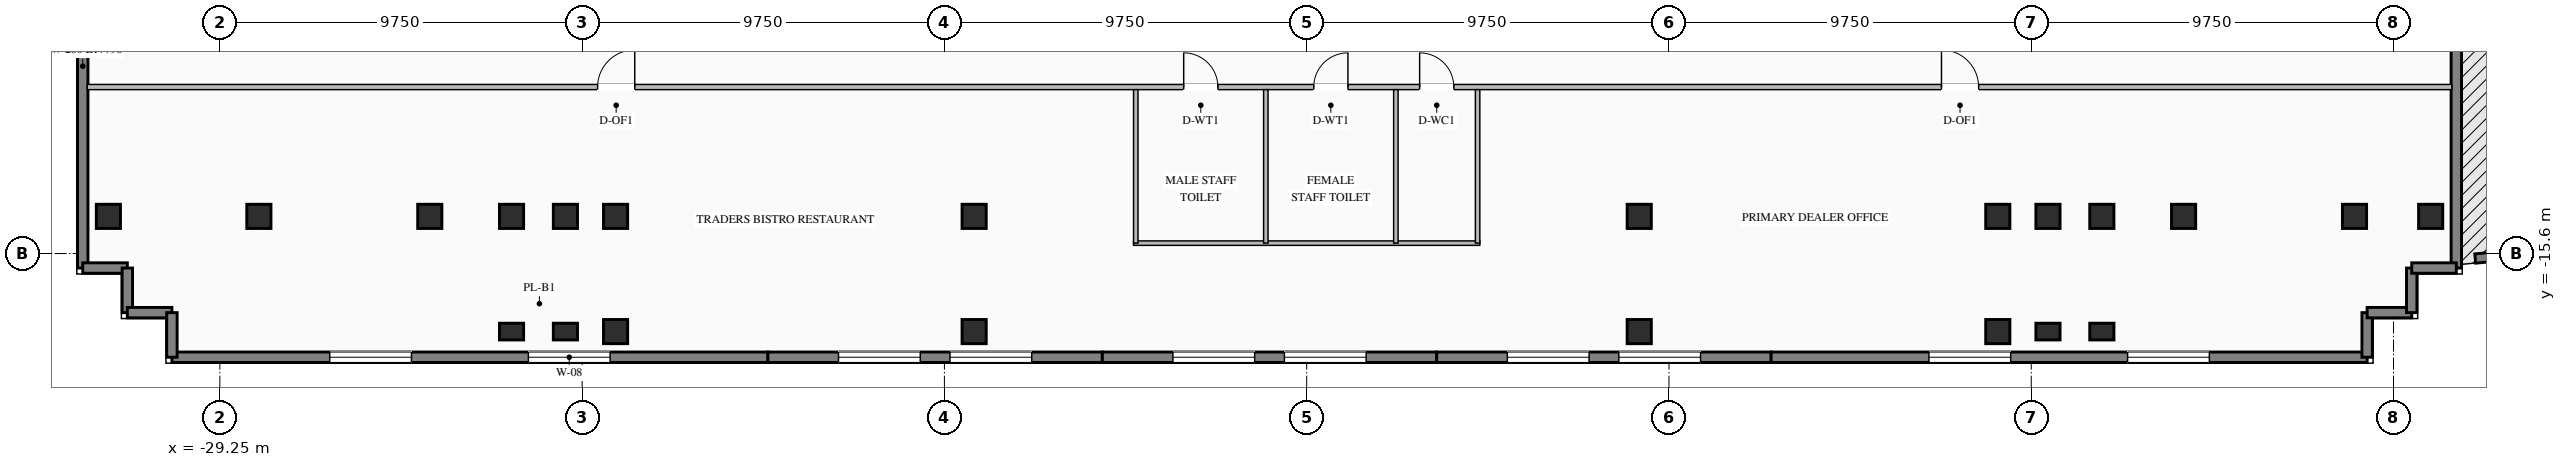
"""IFC4 building model, lengths in metres.
Left out: names, types, materials, properties, quantities, classifications, styles, units other than length and angle.
Written with IfcOpenShell. Run it as: python <this file> out.ifc"""

import sys

from ifc_helpers import new_model, si_unit, direction, frame, frame_2d, origin, origin_2d, place, context, subcontext, project, spatial, rectangle, i_section, extrude, element, fill, save


model = new_model("IFC4")
c1 = context("Model", 3, precision=1e-05, world=origin(), true_north=direction((0.0, 1.0)))
c2 = subcontext(c1, "Body", "Model", "MODEL_VIEW")
j1 = project(units=[si_unit("LENGTHUNIT", "METRE"), si_unit("PLANEANGLEUNIT", "RADIAN")], contexts=[c1])
p1 = place(None, origin())
s1 = spatial("IfcSite", under=j1, at=p1, CompositionType="ELEMENT")
p2 = place(p1, origin())
s2 = spatial("IfcBuilding", under=s1, at=p2, CompositionType="ELEMENT")
p3 = place(p2, frame((0.0, 0.0, 116.65)))
s3 = spatial("IfcBuildingStorey", under=s2, at=p3, CompositionType="ELEMENT", Elevation=116.65)
for number, where, z_axis, x_axis in (
    (1, (-21.4, -14.6, 0.0), (0.0, 0.0, 1.0), (1.0, 0.0, 0.0)),
    (2, (-19.95, -14.6, 0.0), (0.0, 0.0, 1.0), (1.0, 0.0, 0.0)),
    (3, (-18.6, -14.6, 0.0), (0.0, 0.0, 1.0), (1.0, 0.0, 0.0)),
    (4, (-8.95, -14.6, 0.0), (0.0, 0.0, 1.0), (1.0, 0.0, 0.0)),
    (5, (8.95, -14.6, 0.0), (0.0, 0.0, 1.0), (1.0, 0.0, 0.0)),
    (6, (18.6, -14.6, 0.0), (0.0, 0.0, 1.0), (1.0, 0.0, 0.0)),
    (7, (19.95, -14.6, 0.0), (0.0, 0.0, 1.0), (1.0, 0.0, 0.0)),
    (8, (21.4, -14.6, 0.0), (0.0, 0.0, 1.0), (1.0, 0.0, 0.0)),
    (9, (-23.6, -14.6, 0.0), (0.0, 0.0, 1.0), (1.0, 0.0, 0.0)),
    (10, (23.6, -14.6, 0.0), (0.0, 0.0, 1.0), (1.0, 0.0, 0.0)),
    (11, (-28.2, -14.6, 0.0), (0.0, 0.0, 1.0), (1.0, 0.0, 0.0)),
    (12, (28.2, -14.6, 0.0), (0.0, 0.0, 1.0), (1.0, 0.0, 0.0)),
):
    element("IfcColumn", number, at=place(p3, frame(where, z_axis=z_axis, x_axis=x_axis)), inside=s3, PredefinedType="COLUMN", context=c2, shape_type="SweptSolid", body=[
        extrude(i_section(OverallWidth=0.65, OverallDepth=0.65, WebThickness=0.028, FlangeThickness=0.04, at=origin_2d()), origin(), (0.0, 0.0, 1.0), 4.2),
    ])
for number, where, z_axis, x_axis in (
    (13, (-18.6, -17.7, -0.28), (0.0, 0.0, 1.0), (1.0, 0.0, 0.0)),
    (14, (-8.95, -17.7, -0.28), (0.0, 0.0, 1.0), (1.0, 0.0, 0.0)),
):
    element("IfcColumn", number, at=place(p3, frame(where, z_axis=z_axis, x_axis=x_axis)), inside=s3, PredefinedType="COLUMN", context=c2, shape_type="SweptSolid", body=[
        extrude(i_section(OverallWidth=0.65, OverallDepth=0.65, WebThickness=0.028, FlangeThickness=0.04, at=origin_2d()), origin(), (0.0, 0.0, 1.0), 4.48),
    ])
p4 = place(p3, frame((8.95, -17.7, 0.0), z_axis=(0.0, 0.0, 1.0), x_axis=(1.0, 0.0, 0.0)))
e15 = element("IfcColumn", 15, at=p4, inside=s3, PredefinedType="COLUMN", context=c2, shape_type="SweptSolid", body=[
    extrude(i_section(OverallWidth=0.65, OverallDepth=0.65, WebThickness=0.028, FlangeThickness=0.04, at=origin_2d()), origin(), (0.0, 0.0, 1.0), 4.2),
])
for number, where, z_axis, x_axis in (
    (16, (18.6, -17.7, -0.28), (0.0, 0.0, 1.0), (1.0, 0.0, 0.0)),
    (17, (-32.25, -14.6, -0.28), (0.0, 0.0, 1.0), (1.0, 0.0, 0.0)),
    (18, (30.25, -14.6, -0.28), (0.0, 0.0, 1.0), (1.0, 0.0, 0.0)),
):
    element("IfcColumn", number, at=place(p3, frame(where, z_axis=z_axis, x_axis=x_axis)), inside=s3, PredefinedType="COLUMN", context=c2, shape_type="SweptSolid", body=[
        extrude(i_section(OverallWidth=0.65, OverallDepth=0.65, WebThickness=0.028, FlangeThickness=0.04, at=origin_2d()), origin(), (0.0, 0.0, 1.0), 4.48),
    ])
for number, where, z_axis, x_axis in (
    (19, (-21.4, -17.7, -0.28), (0.0, 0.0, 1.0), (1.0, 0.0, 0.0)),
    (20, (-19.95, -17.7, -0.28), (0.0, 0.0, 1.0), (1.0, 0.0, 0.0)),
    (21, (19.95, -17.7, -0.28), (0.0, 0.0, 1.0), (1.0, 0.0, 0.0)),
    (22, (21.4, -17.7, -0.28), (0.0, 0.0, 1.0), (1.0, 0.0, 0.0)),
):
    element("IfcColumn", number, at=place(p3, frame(where, z_axis=z_axis, x_axis=x_axis)), inside=s3, PredefinedType="PILASTER", context=c2, shape_type="SweptSolid", body=[
        extrude(rectangle(XDim=0.65, YDim=0.45, at=origin_2d()), origin(), (0.0, 0.0, 1.0), 4.48),
    ])
p5 = place(p3, frame((-14.5, -18.39, 0.0), z_axis=(0.0, 0.0, 1.0), x_axis=(-1.0, 0.0, 0.0)))
e23 = element("IfcWall", 23, at=p5, inside=s3, PredefinedType="STANDARD", context=c2, shape_type="SweptSolid", body=[
    extrude(rectangle(XDim=16.04, YDim=0.28, at=frame_2d((8.02, 0.0))), origin(), (0.0, 0.0, 1.0), 4.0),
])
p6 = place(p5, frame((4.247, 0.0, 0.76)))
e24 = element("IfcOpeningElement", 24, at=p6, cuts=e23, PredefinedType="OPENING", context=c2, shape_type="SweptSolid", body=[
    extrude(rectangle(XDim=2.2, YDim=2.25, at=frame_2d((1.1, 1.125))), frame((0.0, 0.15, 0.0), z_axis=(0.0, -1.0, 0.0), x_axis=(1.0, 0.0, 0.0)), (0.0, 0.0, 1.0), 0.3),
])
p7 = place(p5, frame((9.593, 0.0, 0.76)))
e25 = element("IfcOpeningElement", 25, at=p7, cuts=e23, PredefinedType="OPENING", context=c2, shape_type="SweptSolid", body=[
    extrude(rectangle(XDim=2.2, YDim=2.25, at=frame_2d((1.1, 1.125))), frame((0.0, 0.15, 0.0), z_axis=(0.0, -1.0, 0.0), x_axis=(1.0, 0.0, 0.0)), (0.0, 0.0, 1.0), 0.3),
])
p8 = place(p3, frame((-5.5, -18.39, 0.0), z_axis=(0.0, 0.0, 1.0), x_axis=(-1.0, 0.0, 0.0)))
e26 = element("IfcWall", 26, at=p8, inside=s3, PredefinedType="STANDARD", context=c2, shape_type="SweptSolid", body=[
    extrude(rectangle(XDim=9.0, YDim=0.28, at=frame_2d((4.5, 0.0))), origin(), (0.0, 0.0, 1.0), 4.0),
])
p9 = place(p8, frame((1.9, 0.0, 0.76)))
e27 = element("IfcOpeningElement", 27, at=p9, cuts=e26, PredefinedType="OPENING", context=c2, shape_type="SweptSolid", body=[
    extrude(rectangle(XDim=2.2, YDim=2.25, at=frame_2d((1.1, 1.125))), frame((0.0, 0.15, 0.0), z_axis=(0.0, -1.0, 0.0), x_axis=(1.0, 0.0, 0.0)), (0.0, 0.0, 1.0), 0.3),
])
p10 = place(p8, frame((4.9, 0.0, 0.76)))
e28 = element("IfcOpeningElement", 28, at=p10, cuts=e26, PredefinedType="OPENING", context=c2, shape_type="SweptSolid", body=[
    extrude(rectangle(XDim=2.2, YDim=2.25, at=frame_2d((1.1, 1.125))), frame((0.0, 0.15, 0.0), z_axis=(0.0, -1.0, 0.0), x_axis=(1.0, 0.0, 0.0)), (0.0, 0.0, 1.0), 0.3),
])
p11 = place(p3, frame((3.5, -18.39, 0.0), z_axis=(0.0, 0.0, 1.0), x_axis=(-1.0, 0.0, 0.0)))
e29 = element("IfcWall", 29, at=p11, inside=s3, PredefinedType="STANDARD", context=c2, shape_type="SweptSolid", body=[
    extrude(rectangle(XDim=9.0, YDim=0.28, at=frame_2d((4.5, 0.0))), origin(), (0.0, 0.0, 1.0), 4.0),
])
p12 = place(p11, frame((1.9, 0.0, 0.76)))
e30 = element("IfcOpeningElement", 30, at=p12, cuts=e29, PredefinedType="OPENING", context=c2, shape_type="SweptSolid", body=[
    extrude(rectangle(XDim=2.2, YDim=2.25, at=frame_2d((1.1, 1.125))), frame((0.0, 0.15, 0.0), z_axis=(0.0, -1.0, 0.0), x_axis=(1.0, 0.0, 0.0)), (0.0, 0.0, 1.0), 0.3),
])
p13 = place(p11, frame((4.9, 0.0, 0.76)))
e31 = element("IfcOpeningElement", 31, at=p13, cuts=e29, PredefinedType="OPENING", context=c2, shape_type="SweptSolid", body=[
    extrude(rectangle(XDim=2.2, YDim=2.25, at=frame_2d((1.1, 1.125))), frame((0.0, 0.15, 0.0), z_axis=(0.0, -1.0, 0.0), x_axis=(1.0, 0.0, 0.0)), (0.0, 0.0, 1.0), 0.3),
])
p14 = place(p3, frame((12.5, -18.39, 0.0), z_axis=(0.0, 0.0, 1.0), x_axis=(-1.0, 0.0, 0.0)))
e32 = element("IfcWall", 32, at=p14, inside=s3, PredefinedType="STANDARD", context=c2, shape_type="SweptSolid", body=[
    extrude(rectangle(XDim=9.0, YDim=0.28, at=frame_2d((4.5, 0.0))), origin(), (0.0, 0.0, 1.0), 4.0),
])
p15 = place(p14, frame((1.9, 0.0, 0.76)))
e33 = element("IfcOpeningElement", 33, at=p15, cuts=e32, PredefinedType="OPENING", context=c2, shape_type="SweptSolid", body=[
    extrude(rectangle(XDim=2.2, YDim=2.25, at=frame_2d((1.1, 1.125))), frame((0.0, 0.15, 0.0), z_axis=(0.0, -1.0, 0.0), x_axis=(1.0, 0.0, 0.0)), (0.0, 0.0, 1.0), 0.3),
])
p16 = place(p14, frame((4.9, 0.0, 0.76)))
e34 = element("IfcOpeningElement", 34, at=p16, cuts=e32, PredefinedType="OPENING", context=c2, shape_type="SweptSolid", body=[
    extrude(rectangle(XDim=2.2, YDim=2.25, at=frame_2d((1.1, 1.125))), frame((0.0, 0.15, 0.0), z_axis=(0.0, -1.0, 0.0), x_axis=(1.0, 0.0, 0.0)), (0.0, 0.0, 1.0), 0.3),
])
p17 = place(p3, frame((28.54, -18.39, 0.0), z_axis=(0.0, 0.0, 1.0), x_axis=(-1.0, 0.0, 0.0)))
e35 = element("IfcWall", 35, at=p17, inside=s3, PredefinedType="STANDARD", context=c2, shape_type="SweptSolid", body=[
    extrude(rectangle(XDim=16.04, YDim=0.28, at=frame_2d((8.02, 0.0))), origin(), (0.0, 0.0, 1.0), 4.0),
])
p18 = place(p17, frame((4.247, 0.0, 0.76)))
e36 = element("IfcOpeningElement", 36, at=p18, cuts=e35, PredefinedType="OPENING", context=c2, shape_type="SweptSolid", body=[
    extrude(rectangle(XDim=2.2, YDim=2.25, at=frame_2d((1.1, 1.125))), frame((0.0, 0.15, 0.0), z_axis=(0.0, -1.0, 0.0), x_axis=(1.0, 0.0, 0.0)), (0.0, 0.0, 1.0), 0.3),
])
p19 = place(p17, frame((9.593, 0.0, 0.76)))
e37 = element("IfcOpeningElement", 37, at=p19, cuts=e35, PredefinedType="OPENING", context=c2, shape_type="SweptSolid", body=[
    extrude(rectangle(XDim=2.2, YDim=2.25, at=frame_2d((1.1, 1.125))), frame((0.0, 0.15, 0.0), z_axis=(0.0, -1.0, 0.0), x_axis=(1.0, 0.0, 0.0)), (0.0, 0.0, 1.0), 0.3),
])
p20 = place(p3, frame((-32.94, -15.99, 0.0), z_axis=(0.0, 0.0, 1.0), x_axis=(0.0, 1.0, 0.0)))
e38 = element("IfcWall", 38, at=p20, inside=s3, PredefinedType="STANDARD", context=c2, shape_type="SweptSolid", body=[
    extrude(rectangle(XDim=17.79, YDim=0.28, at=frame_2d((8.895, 0.0))), origin(), (0.0, 0.0, 1.0), 4.0),
])
p21 = place(p20, frame((10.86, 0.0, 0.76)))
e39 = element("IfcOpeningElement", 39, at=p21, cuts=e38, PredefinedType="OPENING", context=c2, shape_type="SweptSolid", body=[
    extrude(rectangle(XDim=2.0, YDim=2.05, at=frame_2d((1.0, 1.025))), frame((0.0, 0.15, 0.0), z_axis=(0.0, -1.0, 0.0), x_axis=(1.0, 0.0, 0.0)), (0.0, 0.0, 1.0), 0.3),
])
p22 = place(p3, frame((30.94, 1.8, 0.0), z_axis=(0.0, 0.0, 1.0), x_axis=(0.0, -1.0, 0.0)))
e40 = element("IfcWall", 40, at=p22, inside=s3, PredefinedType="STANDARD", context=c2, shape_type="SweptSolid", body=[
    extrude(rectangle(XDim=17.79, YDim=0.28, at=frame_2d((8.895, 0.0))), origin(), (0.0, 0.0, 1.0), 4.0),
])
p23 = place(p22, frame((4.93, 0.0, 0.76)))
e41 = element("IfcOpeningElement", 41, at=p23, cuts=e40, PredefinedType="OPENING", context=c2, shape_type="SweptSolid", body=[
    extrude(rectangle(XDim=2.0, YDim=2.05, at=frame_2d((1.0, 1.025))), frame((0.0, 0.15, 0.0), z_axis=(0.0, -1.0, 0.0), x_axis=(1.0, 0.0, 0.0)), (0.0, 0.0, 1.0), 0.3),
])
for number, where, z_axis, x_axis in (
    (42, (28.54, -18.39, 0.0), (0.0, 0.0, 1.0), (0.0, 1.0, 0.0)),
    (43, (28.54, -17.19, 0.0), (0.0, 0.0, 1.0), (1.0, 0.0, 0.0)),
    (44, (29.74, -17.19, 0.0), (0.0, 0.0, 1.0), (0.0, 1.0, 0.0)),
    (45, (29.74, -15.99, 0.0), (0.0, 0.0, 1.0), (1.0, 0.0, 0.0)),
    (46, (-32.94, -15.99, 0.0), (0.0, 0.0, 1.0), (1.0, 0.0, 0.0)),
    (47, (-31.74, -15.99, 0.0), (0.0, 0.0, 1.0), (0.0, -1.0, 0.0)),
    (48, (-31.74, -17.19, 0.0), (0.0, 0.0, 1.0), (1.0, 0.0, 0.0)),
    (49, (-30.54, -17.19, 0.0), (0.0, 0.0, 1.0), (0.0, -1.0, 0.0)),
):
    element("IfcWall", number, at=place(p3, frame(where, z_axis=z_axis, x_axis=x_axis)), inside=s3, PredefinedType="STANDARD", context=c2, shape_type="SweptSolid", body=[
        extrude(rectangle(XDim=1.2, YDim=0.28, at=frame_2d((0.6, 0.0))), origin(), (0.0, 0.0, 1.0), 4.0),
    ])
p24 = place(p3, frame((37.146, -15.187, 0.0), z_axis=(0.0, 0.0, 1.0), x_axis=(-0.995394635586, -0.095861981234, 0.0)))
e50 = element("IfcWall", 50, at=p24, inside=s3, PredefinedType="PARAPET", context=c2, shape_type="SweptSolid", body=[
    extrude(rectangle(XDim=5.723, YDim=0.25, at=frame_2d((2.861, 0.0))), origin(), (0.0, 0.0, 1.0), 1.2),
])
p25 = place(p3, frame((-32.82, -11.12, 0.0), z_axis=(0.0, 0.0, 1.0), x_axis=(1.0, 0.0, 0.0)))
e51 = element("IfcWall", 51, at=p25, inside=s3, PredefinedType="STANDARD", context=c2, shape_type="SweptSolid", body=[
    extrude(rectangle(XDim=63.64, YDim=0.14, at=frame_2d((31.82, 0.0))), origin(), (0.0, 0.0, 1.0), 4.0),
])
p26 = place(p25, frame((29.51, 0.0, 0.0)))
e52 = element("IfcOpeningElement", 52, at=p26, cuts=e51, PredefinedType="OPENING", context=c2, shape_type="SweptSolid", body=[
    extrude(rectangle(XDim=0.92, YDim=2.08, at=frame_2d((0.46, 1.04))), frame((0.0, 0.08, 0.0), z_axis=(0.0, -1.0, 0.0), x_axis=(1.0, 0.0, 0.0)), (0.0, 0.0, 1.0), 0.16),
])
p27 = place(p25, frame((33.01, 0.0, 0.0)))
e53 = element("IfcOpeningElement", 53, at=p27, cuts=e51, PredefinedType="OPENING", context=c2, shape_type="SweptSolid", body=[
    extrude(rectangle(XDim=0.92, YDim=2.08, at=frame_2d((0.46, 1.04))), frame((0.0, 0.08, 0.0), z_axis=(0.0, -1.0, 0.0), x_axis=(1.0, 0.0, 0.0)), (0.0, 0.0, 1.0), 0.16),
])
p28 = place(p25, frame((35.86, 0.0, 0.0)))
e54 = element("IfcOpeningElement", 54, at=p28, cuts=e51, PredefinedType="OPENING", context=c2, shape_type="SweptSolid", body=[
    extrude(rectangle(XDim=0.92, YDim=2.08, at=frame_2d((0.46, 1.04))), frame((0.0, 0.08, 0.0), z_axis=(0.0, -1.0, 0.0), x_axis=(1.0, 0.0, 0.0)), (0.0, 0.0, 1.0), 0.16),
])
p29 = place(p25, frame((13.736, 0.0, 0.0)))
e55 = element("IfcOpeningElement", 55, at=p29, cuts=e51, PredefinedType="OPENING", context=c2, shape_type="SweptSolid", body=[
    extrude(rectangle(XDim=1.0, YDim=2.08, at=frame_2d((0.5, 1.04))), frame((0.0, 0.08, 0.0), z_axis=(0.0, -1.0, 0.0), x_axis=(1.0, 0.0, 0.0)), (0.0, 0.0, 1.0), 0.16),
])
p30 = place(p25, frame((49.904, 0.0, 0.0)))
e56 = element("IfcOpeningElement", 56, at=p30, cuts=e51, PredefinedType="OPENING", context=c2, shape_type="SweptSolid", body=[
    extrude(rectangle(XDim=1.0, YDim=2.08, at=frame_2d((0.5, 1.04))), frame((0.0, 0.08, 0.0), z_axis=(0.0, -1.0, 0.0), x_axis=(1.0, 0.0, 0.0)), (0.0, 0.0, 1.0), 0.16),
])
p31 = place(p3, frame((-4.66, -15.32, 0.0), z_axis=(0.0, 0.0, 1.0), x_axis=(1.0, 0.0, 0.0)))
e57 = element("IfcWall", 57, at=p31, inside=s3, PredefinedType="STANDARD", context=c2, shape_type="SweptSolid", body=[
    extrude(rectangle(XDim=9.32, YDim=0.12, at=frame_2d((4.66, 0.0))), origin(), (0.0, 0.0, 1.0), 4.0),
])
for number, where, z_axis, x_axis in (
    (58, (-4.6, -15.32, 0.0), (0.0, 0.0, 1.0), (0.0, 1.0, 0.0)),
    (59, (-1.1, -15.32, 0.0), (0.0, 0.0, 1.0), (0.0, 1.0, 0.0)),
    (60, (2.4, -15.32, 0.0), (0.0, 0.0, 1.0), (0.0, 1.0, 0.0)),
    (61, (4.6, -15.32, 0.0), (0.0, 0.0, 1.0), (0.0, 1.0, 0.0)),
):
    element("IfcWall", number, at=place(p3, frame(where, z_axis=z_axis, x_axis=x_axis)), inside=s3, PredefinedType="STANDARD", context=c2, shape_type="SweptSolid", body=[
        extrude(rectangle(XDim=4.13, YDim=0.12, at=frame_2d((2.065, 0.0))), origin(), (0.0, 0.0, 1.0), 4.0),
    ])
p32 = place(p6, origin())
e62 = element("IfcWindow", 62, at=p32, inside=s3, PartitioningType="DOUBLE_PANEL_VERTICAL", PredefinedType="WINDOW", context=c2, shape_type="SweptSolid", body=[
    extrude(rectangle(XDim=2.2, YDim=2.25, at=frame_2d((1.1, 1.125))), frame((0.0, 0.03, 0.0), z_axis=(0.0, -1.0, 0.0), x_axis=(1.0, 0.0, 0.0)), (0.0, 0.0, 1.0), 0.06),
])
fill(e24, e62)
p33 = place(p7, origin())
e63 = element("IfcWindow", 63, at=p33, inside=s3, PartitioningType="DOUBLE_PANEL_VERTICAL", PredefinedType="WINDOW", context=c2, shape_type="SweptSolid", body=[
    extrude(rectangle(XDim=2.2, YDim=2.25, at=frame_2d((1.1, 1.125))), frame((0.0, 0.03, 0.0), z_axis=(0.0, -1.0, 0.0), x_axis=(1.0, 0.0, 0.0)), (0.0, 0.0, 1.0), 0.06),
])
fill(e25, e63)
p34 = place(p9, origin())
e64 = element("IfcWindow", 64, at=p34, inside=s3, PartitioningType="DOUBLE_PANEL_VERTICAL", PredefinedType="WINDOW", context=c2, shape_type="SweptSolid", body=[
    extrude(rectangle(XDim=2.2, YDim=2.25, at=frame_2d((1.1, 1.125))), frame((0.0, 0.03, 0.0), z_axis=(0.0, -1.0, 0.0), x_axis=(1.0, 0.0, 0.0)), (0.0, 0.0, 1.0), 0.06),
])
fill(e27, e64)
p35 = place(p10, origin())
e65 = element("IfcWindow", 65, at=p35, inside=s3, PartitioningType="DOUBLE_PANEL_VERTICAL", PredefinedType="WINDOW", context=c2, shape_type="SweptSolid", body=[
    extrude(rectangle(XDim=2.2, YDim=2.25, at=frame_2d((1.1, 1.125))), frame((0.0, 0.03, 0.0), z_axis=(0.0, -1.0, 0.0), x_axis=(1.0, 0.0, 0.0)), (0.0, 0.0, 1.0), 0.06),
])
fill(e28, e65)
p36 = place(p12, origin())
e66 = element("IfcWindow", 66, at=p36, inside=s3, PartitioningType="DOUBLE_PANEL_VERTICAL", PredefinedType="WINDOW", context=c2, shape_type="SweptSolid", body=[
    extrude(rectangle(XDim=2.2, YDim=2.25, at=frame_2d((1.1, 1.125))), frame((0.0, 0.03, 0.0), z_axis=(0.0, -1.0, 0.0), x_axis=(1.0, 0.0, 0.0)), (0.0, 0.0, 1.0), 0.06),
])
fill(e30, e66)
p37 = place(p13, origin())
e67 = element("IfcWindow", 67, at=p37, inside=s3, PartitioningType="DOUBLE_PANEL_VERTICAL", PredefinedType="WINDOW", context=c2, shape_type="SweptSolid", body=[
    extrude(rectangle(XDim=2.2, YDim=2.25, at=frame_2d((1.1, 1.125))), frame((0.0, 0.03, 0.0), z_axis=(0.0, -1.0, 0.0), x_axis=(1.0, 0.0, 0.0)), (0.0, 0.0, 1.0), 0.06),
])
fill(e31, e67)
p38 = place(p15, origin())
e68 = element("IfcWindow", 68, at=p38, inside=s3, PartitioningType="DOUBLE_PANEL_VERTICAL", PredefinedType="WINDOW", context=c2, shape_type="SweptSolid", body=[
    extrude(rectangle(XDim=2.2, YDim=2.25, at=frame_2d((1.1, 1.125))), frame((0.0, 0.03, 0.0), z_axis=(0.0, -1.0, 0.0), x_axis=(1.0, 0.0, 0.0)), (0.0, 0.0, 1.0), 0.06),
])
fill(e33, e68)
p39 = place(p16, origin())
e69 = element("IfcWindow", 69, at=p39, inside=s3, PartitioningType="DOUBLE_PANEL_VERTICAL", PredefinedType="WINDOW", context=c2, shape_type="SweptSolid", body=[
    extrude(rectangle(XDim=2.2, YDim=2.25, at=frame_2d((1.1, 1.125))), frame((0.0, 0.03, 0.0), z_axis=(0.0, -1.0, 0.0), x_axis=(1.0, 0.0, 0.0)), (0.0, 0.0, 1.0), 0.06),
])
fill(e34, e69)
p40 = place(p18, origin())
e70 = element("IfcWindow", 70, at=p40, inside=s3, PartitioningType="DOUBLE_PANEL_VERTICAL", PredefinedType="WINDOW", context=c2, shape_type="SweptSolid", body=[
    extrude(rectangle(XDim=2.2, YDim=2.25, at=frame_2d((1.1, 1.125))), frame((0.0, 0.03, 0.0), z_axis=(0.0, -1.0, 0.0), x_axis=(1.0, 0.0, 0.0)), (0.0, 0.0, 1.0), 0.06),
])
fill(e36, e70)
p41 = place(p19, origin())
e71 = element("IfcWindow", 71, at=p41, inside=s3, PartitioningType="DOUBLE_PANEL_VERTICAL", PredefinedType="WINDOW", context=c2, shape_type="SweptSolid", body=[
    extrude(rectangle(XDim=2.2, YDim=2.25, at=frame_2d((1.1, 1.125))), frame((0.0, 0.03, 0.0), z_axis=(0.0, -1.0, 0.0), x_axis=(1.0, 0.0, 0.0)), (0.0, 0.0, 1.0), 0.06),
])
fill(e37, e71)
p42 = place(p26, origin())
e72 = element("IfcDoor", 72, at=p42, inside=s3, OperationType="SINGLE_SWING_LEFT", PredefinedType="DOOR", context=c2, shape_type="SweptSolid", body=[
    extrude(rectangle(XDim=0.92, YDim=2.08, at=frame_2d((0.46, 1.04))), frame((0.0, 0.025, 0.0), z_axis=(0.0, -1.0, 0.0), x_axis=(1.0, 0.0, 0.0)), (0.0, 0.0, 1.0), 0.05),
])
fill(e52, e72)
p43 = place(p27, origin())
e73 = element("IfcDoor", 73, at=p43, inside=s3, OperationType="SINGLE_SWING_RIGHT", PredefinedType="DOOR", context=c2, shape_type="SweptSolid", body=[
    extrude(rectangle(XDim=0.92, YDim=2.08, at=frame_2d((0.46, 1.04))), frame((0.0, 0.025, 0.0), z_axis=(0.0, -1.0, 0.0), x_axis=(1.0, 0.0, 0.0)), (0.0, 0.0, 1.0), 0.05),
])
fill(e53, e73)
p44 = place(p28, origin())
e74 = element("IfcDoor", 74, at=p44, inside=s3, OperationType="SINGLE_SWING_LEFT", PredefinedType="DOOR", context=c2, shape_type="SweptSolid", body=[
    extrude(rectangle(XDim=0.92, YDim=2.08, at=frame_2d((0.46, 1.04))), frame((0.0, 0.025, 0.0), z_axis=(0.0, -1.0, 0.0), x_axis=(1.0, 0.0, 0.0)), (0.0, 0.0, 1.0), 0.05),
])
fill(e54, e74)
p45 = place(p29, origin())
e75 = element("IfcDoor", 75, at=p45, inside=s3, OperationType="SINGLE_SWING_RIGHT", PredefinedType="DOOR", context=c2, shape_type="SweptSolid", body=[
    extrude(rectangle(XDim=1.0, YDim=2.08, at=frame_2d((0.5, 1.04))), frame((0.0, 0.025, 0.0), z_axis=(0.0, -1.0, 0.0), x_axis=(1.0, 0.0, 0.0)), (0.0, 0.0, 1.0), 0.05),
])
fill(e55, e75)
p46 = place(p30, origin())
e76 = element("IfcDoor", 76, at=p46, inside=s3, OperationType="SINGLE_SWING_LEFT", PredefinedType="DOOR", context=c2, shape_type="SweptSolid", body=[
    extrude(rectangle(XDim=1.0, YDim=2.08, at=frame_2d((0.5, 1.04))), frame((0.0, 0.025, 0.0), z_axis=(0.0, -1.0, 0.0), x_axis=(1.0, 0.0, 0.0)), (0.0, 0.0, 1.0), 0.05),
])
fill(e56, e76)
save(model, sys.argv[1])
